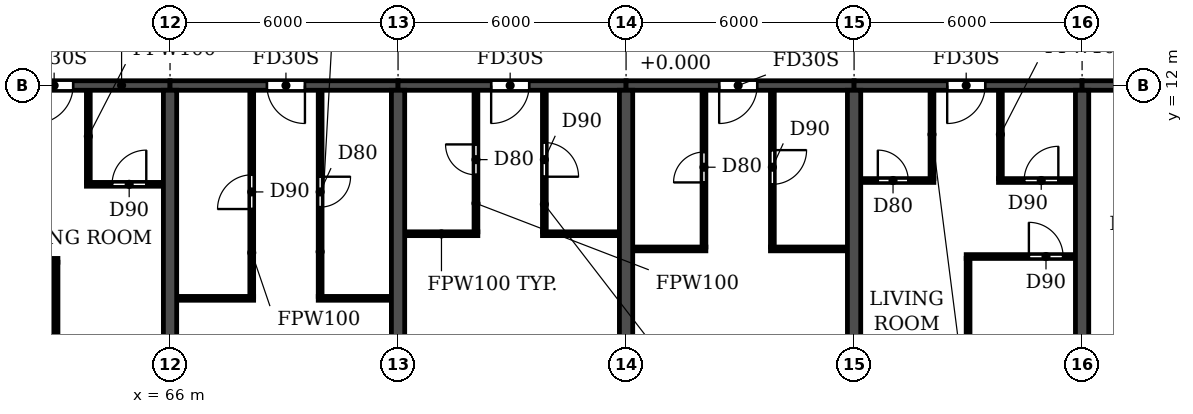
"""IFC4 building model, lengths in metres.
Left out: names, types, materials, properties, quantities, classifications, styles, units other than length and angle.
Written with IfcOpenShell. Run it as: python <this file> out.ifc"""

import sys

from ifc_helpers import new_model, si_unit, direction, frame, frame_2d, origin, place, context, subcontext, project, spatial, rectangle, extrude, element, fill, save


model = new_model("IFC4")
c1 = context("Model", 3, precision=1e-05, world=origin(), true_north=direction((0.0, 1.0)))
c2 = subcontext(c1, "Body", "Model", "MODEL_VIEW")
j1 = project(units=[si_unit("LENGTHUNIT", "METRE"), si_unit("PLANEANGLEUNIT", "RADIAN")], contexts=[c1])
p1 = place(None, origin())
s1 = spatial("IfcSite", under=j1, at=p1, CompositionType="ELEMENT")
p2 = place(p1, origin())
s2 = spatial("IfcBuilding", under=s1, at=p2, CompositionType="ELEMENT")
p3 = place(p2, frame((0.0, 0.0, 92.7)))
s3 = spatial("IfcBuildingStorey", under=s2, at=p3, CompositionType="ELEMENT", Elevation=92.7)
for number, where, z_axis, x_axis in (
    (1, (66.0, 0.2, 0.0), (0.0, 0.0, 1.0), (0.0, 1.0, 0.0)),
    (2, (72.0, 0.2, 0.0), (0.0, 0.0, 1.0), (0.0, 1.0, 0.0)),
    (3, (78.0, 0.2, 0.0), (0.0, 0.0, 1.0), (0.0, 1.0, 0.0)),
    (4, (84.0, 0.2, 0.0), (0.0, 0.0, 1.0), (0.0, 1.0, 0.0)),
    (5, (90.0, 0.2, 0.0), (0.0, 0.0, 1.0), (0.0, 1.0, 0.0)),
):
    element("IfcWall", number, at=place(p3, frame(where, z_axis=z_axis, x_axis=x_axis)), inside=s3, PredefinedType="SHEAR", context=c2, shape_type="SweptSolid", body=[
        extrude(rectangle(XDim=11.675, YDim=0.35, at=frame_2d((5.837, 0.0))), origin(), (0.0, 0.0, 1.0), 3.06),
    ])
p4 = place(p3, frame((60.0, 12.0, 0.0), z_axis=(0.0, 0.0, 1.0), x_axis=(1.0, 0.0, 0.0)))
e6 = element("IfcWall", 6, at=p4, inside=s3, PredefinedType="SHEAR", context=c2, shape_type="SweptSolid", body=[
    extrude(rectangle(XDim=6.0, YDim=0.25, at=frame_2d((3.0, 0.0))), origin(), (0.0, 0.0, 1.0), 2.46),
])
p5 = place(p4, frame((2.45, 0.0, 0.0)))
e7 = element("IfcOpeningElement", 7, at=p5, cuts=e6, PredefinedType="OPENING", context=c2, shape_type="SweptSolid", body=[
    extrude(rectangle(XDim=1.0, YDim=2.1, at=frame_2d((0.5, 1.05))), frame((0.0, 0.135, 0.0), z_axis=(0.0, -1.0, 0.0), x_axis=(1.0, 0.0, 0.0)), (0.0, 0.0, 1.0), 0.27),
])
p6 = place(p3, frame((66.0, 12.0, 0.0), z_axis=(0.0, 0.0, 1.0), x_axis=(1.0, 0.0, 0.0)))
e8 = element("IfcWall", 8, at=p6, inside=s3, PredefinedType="SHEAR", context=c2, shape_type="SweptSolid", body=[
    extrude(rectangle(XDim=6.0, YDim=0.25, at=frame_2d((3.0, 0.0))), origin(), (0.0, 0.0, 1.0), 2.46),
])
p7 = place(p6, frame((2.55, 0.0, 0.0)))
e9 = element("IfcOpeningElement", 9, at=p7, cuts=e8, PredefinedType="OPENING", context=c2, shape_type="SweptSolid", body=[
    extrude(rectangle(XDim=1.0, YDim=2.1, at=frame_2d((0.5, 1.05))), frame((0.0, 0.135, 0.0), z_axis=(0.0, -1.0, 0.0), x_axis=(1.0, 0.0, 0.0)), (0.0, 0.0, 1.0), 0.27),
])
p8 = place(p3, frame((72.0, 12.0, 0.0), z_axis=(0.0, 0.0, 1.0), x_axis=(1.0, 0.0, 0.0)))
e10 = element("IfcWall", 10, at=p8, inside=s3, PredefinedType="SHEAR", context=c2, shape_type="SweptSolid", body=[
    extrude(rectangle(XDim=6.0, YDim=0.25, at=frame_2d((3.0, 0.0))), origin(), (0.0, 0.0, 1.0), 2.46),
])
p9 = place(p8, frame((2.45, 0.0, 0.0)))
e11 = element("IfcOpeningElement", 11, at=p9, cuts=e10, PredefinedType="OPENING", context=c2, shape_type="SweptSolid", body=[
    extrude(rectangle(XDim=1.0, YDim=2.1, at=frame_2d((0.5, 1.05))), frame((0.0, 0.135, 0.0), z_axis=(0.0, -1.0, 0.0), x_axis=(1.0, 0.0, 0.0)), (0.0, 0.0, 1.0), 0.27),
])
p10 = place(p3, frame((78.0, 12.0, 0.0), z_axis=(0.0, 0.0, 1.0), x_axis=(1.0, 0.0, 0.0)))
e12 = element("IfcWall", 12, at=p10, inside=s3, PredefinedType="SHEAR", context=c2, shape_type="SweptSolid", body=[
    extrude(rectangle(XDim=6.0, YDim=0.25, at=frame_2d((3.0, 0.0))), origin(), (0.0, 0.0, 1.0), 2.46),
])
p11 = place(p10, frame((2.45, 0.0, 0.0)))
e13 = element("IfcOpeningElement", 13, at=p11, cuts=e12, PredefinedType="OPENING", context=c2, shape_type="SweptSolid", body=[
    extrude(rectangle(XDim=1.0, YDim=2.1, at=frame_2d((0.5, 1.05))), frame((0.0, 0.135, 0.0), z_axis=(0.0, -1.0, 0.0), x_axis=(1.0, 0.0, 0.0)), (0.0, 0.0, 1.0), 0.27),
])
p12 = place(p3, frame((84.0, 12.0, 0.0), z_axis=(0.0, 0.0, 1.0), x_axis=(1.0, 0.0, 0.0)))
e14 = element("IfcWall", 14, at=p12, inside=s3, PredefinedType="SHEAR", context=c2, shape_type="SweptSolid", body=[
    extrude(rectangle(XDim=6.0, YDim=0.25, at=frame_2d((3.0, 0.0))), origin(), (0.0, 0.0, 1.0), 2.46),
])
p13 = place(p12, frame((2.45, 0.0, 0.0)))
e15 = element("IfcOpeningElement", 15, at=p13, cuts=e14, PredefinedType="OPENING", context=c2, shape_type="SweptSolid", body=[
    extrude(rectangle(XDim=1.0, YDim=2.1, at=frame_2d((0.5, 1.05))), frame((0.0, 0.135, 0.0), z_axis=(0.0, -1.0, 0.0), x_axis=(1.0, 0.0, 0.0)), (0.0, 0.0, 1.0), 0.27),
])
p14 = place(p3, frame((90.0, 12.0, 0.0), z_axis=(0.0, 0.0, 1.0), x_axis=(1.0, 0.0, 0.0)))
e16 = element("IfcWall", 16, at=p14, inside=s3, PredefinedType="SHEAR", context=c2, shape_type="SweptSolid", body=[
    extrude(rectangle(XDim=5.8, YDim=0.25, at=frame_2d((2.9, 0.0))), origin(), (0.0, 0.0, 1.0), 2.46),
])
p15 = place(p14, frame((2.5, 0.0, 0.0)))
e17 = element("IfcOpeningElement", 17, at=p15, cuts=e16, PredefinedType="OPENING", context=c2, shape_type="SweptSolid", body=[
    extrude(rectangle(XDim=1.0, YDim=2.1, at=frame_2d((0.5, 1.05))), frame((0.0, 0.135, 0.0), z_axis=(0.0, -1.0, 0.0), x_axis=(1.0, 0.0, 0.0)), (0.0, 0.0, 1.0), 0.27),
])
p16 = place(p3, frame((66.185, 6.4, 0.0), z_axis=(0.0, 0.0, 1.0), x_axis=(1.0, 0.0, 0.0)))
e18 = element("IfcWall", 18, at=p16, inside=s3, PredefinedType="PARTITIONING", context=c2, shape_type="SweptSolid", body=[
    extrude(rectangle(XDim=2.015, YDim=0.1, at=frame_2d((1.007, 0.0))), origin(), (0.0, 0.0, 1.0), 3.06),
])
p17 = place(p3, frame((69.9, 6.4, 0.0), z_axis=(0.0, 0.0, 1.0), x_axis=(1.0, 0.0, 0.0)))
e19 = element("IfcWall", 19, at=p17, inside=s3, PredefinedType="PARTITIONING", context=c2, shape_type="SweptSolid", body=[
    extrude(rectangle(XDim=1.915, YDim=0.1, at=frame_2d((0.958, 0.0))), origin(), (0.0, 0.0, 1.0), 3.06),
])
p18 = place(p3, frame((60.185, 7.4, 0.0), z_axis=(0.0, 0.0, 1.0), x_axis=(1.0, 0.0, 0.0)))
e20 = element("IfcWall", 20, at=p18, inside=s3, PredefinedType="PARTITIONING", context=c2, shape_type="SweptSolid", body=[
    extrude(rectangle(XDim=2.865, YDim=0.1, at=frame_2d((1.433, 0.0))), origin(), (0.0, 0.0, 1.0), 3.06),
])
p19 = place(p18, frame((0.315, 0.0, 0.0)))
e21 = element("IfcOpeningElement", 21, at=p19, cuts=e20, PredefinedType="OPENING", context=c2, shape_type="SweptSolid", body=[
    extrude(rectangle(XDim=0.9, YDim=2.1, at=frame_2d((0.45, 1.05))), frame((0.0, 0.06, 0.0), z_axis=(0.0, -1.0, 0.0), x_axis=(1.0, 0.0, 0.0)), (0.0, 0.0, 1.0), 0.12),
])
p20 = place(p3, frame((86.95, 7.5, 0.0), z_axis=(0.0, 0.0, 1.0), x_axis=(1.0, 0.0, 0.0)))
e22 = element("IfcWall", 22, at=p20, inside=s3, PredefinedType="PARTITIONING", context=c2, shape_type="SweptSolid", body=[
    extrude(rectangle(XDim=2.865, YDim=0.1, at=frame_2d((1.433, 0.0))), origin(), (0.0, 0.0, 1.0), 3.06),
])
p21 = place(p20, frame((1.65, 0.0, 0.0)))
e23 = element("IfcOpeningElement", 23, at=p21, cuts=e22, PredefinedType="OPENING", context=c2, shape_type="SweptSolid", body=[
    extrude(rectangle(XDim=0.9, YDim=2.1, at=frame_2d((0.45, 1.05))), frame((0.0, 0.06, 0.0), z_axis=(0.0, -1.0, 0.0), x_axis=(1.0, 0.0, 0.0)), (0.0, 0.0, 1.0), 0.12),
])
p22 = place(p3, frame((78.185, 7.7, 0.0), z_axis=(0.0, 0.0, 1.0), x_axis=(1.0, 0.0, 0.0)))
e24 = element("IfcWall", 24, at=p22, inside=s3, PredefinedType="PARTITIONING", context=c2, shape_type="SweptSolid", body=[
    extrude(rectangle(XDim=1.915, YDim=0.1, at=frame_2d((0.958, 0.0))), origin(), (0.0, 0.0, 1.0), 3.06),
])
p23 = place(p3, frame((81.8, 7.7, 0.0), z_axis=(0.0, 0.0, 1.0), x_axis=(1.0, 0.0, 0.0)))
e25 = element("IfcWall", 25, at=p23, inside=s3, PredefinedType="PARTITIONING", context=c2, shape_type="SweptSolid", body=[
    extrude(rectangle(XDim=2.015, YDim=0.1, at=frame_2d((1.007, 0.0))), origin(), (0.0, 0.0, 1.0), 3.06),
])
p24 = place(p3, frame((72.185, 8.1, 0.0), z_axis=(0.0, 0.0, 1.0), x_axis=(1.0, 0.0, 0.0)))
e26 = element("IfcWall", 26, at=p24, inside=s3, PredefinedType="PARTITIONING", context=c2, shape_type="SweptSolid", body=[
    extrude(rectangle(XDim=1.915, YDim=0.1, at=frame_2d((0.958, 0.0))), origin(), (0.0, 0.0, 1.0), 3.06),
])
p25 = place(p3, frame((75.8, 8.1, 0.0), z_axis=(0.0, 0.0, 1.0), x_axis=(1.0, 0.0, 0.0)))
e27 = element("IfcWall", 27, at=p25, inside=s3, PredefinedType="PARTITIONING", context=c2, shape_type="SweptSolid", body=[
    extrude(rectangle(XDim=2.015, YDim=0.1, at=frame_2d((1.007, 0.0))), origin(), (0.0, 0.0, 1.0), 3.06),
])
p26 = place(p3, frame((63.8, 9.4, 0.0), z_axis=(0.0, 0.0, 1.0), x_axis=(1.0, 0.0, 0.0)))
e28 = element("IfcWall", 28, at=p26, inside=s3, PredefinedType="PARTITIONING", context=c2, shape_type="SweptSolid", body=[
    extrude(rectangle(XDim=2.015, YDim=0.1, at=frame_2d((1.007, 0.0))), origin(), (0.0, 0.0, 1.0), 3.06),
])
p27 = place(p26, frame((0.675, 0.0, 0.0)))
e29 = element("IfcOpeningElement", 29, at=p27, cuts=e28, PredefinedType="OPENING", context=c2, shape_type="SweptSolid", body=[
    extrude(rectangle(XDim=0.9, YDim=2.1, at=frame_2d((0.45, 1.05))), frame((0.0, 0.06, 0.0), z_axis=(0.0, -1.0, 0.0), x_axis=(1.0, 0.0, 0.0)), (0.0, 0.0, 1.0), 0.12),
])
p28 = place(p3, frame((84.185, 9.5, 0.0), z_axis=(0.0, 0.0, 1.0), x_axis=(1.0, 0.0, 0.0)))
e30 = element("IfcWall", 30, at=p28, inside=s3, PredefinedType="PARTITIONING", context=c2, shape_type="SweptSolid", body=[
    extrude(rectangle(XDim=1.915, YDim=0.1, at=frame_2d((0.958, 0.0))), origin(), (0.0, 0.0, 1.0), 3.06),
])
p29 = place(p28, frame((0.44, 0.0, 0.0)))
e31 = element("IfcOpeningElement", 31, at=p29, cuts=e30, PredefinedType="OPENING", context=c2, shape_type="SweptSolid", body=[
    extrude(rectangle(XDim=0.8, YDim=2.1, at=frame_2d((0.4, 1.05))), frame((0.0, 0.06, 0.0), z_axis=(0.0, -1.0, 0.0), x_axis=(1.0, 0.0, 0.0)), (0.0, 0.0, 1.0), 0.12),
])
p30 = place(p3, frame((87.8, 9.5, 0.0), z_axis=(0.0, 0.0, 1.0), x_axis=(1.0, 0.0, 0.0)))
e32 = element("IfcWall", 32, at=p30, inside=s3, PredefinedType="PARTITIONING", context=c2, shape_type="SweptSolid", body=[
    extrude(rectangle(XDim=2.015, YDim=0.1, at=frame_2d((1.007, 0.0))), origin(), (0.0, 0.0, 1.0), 3.06),
])
p31 = place(p30, frame((0.675, 0.0, 0.0)))
e33 = element("IfcOpeningElement", 33, at=p31, cuts=e32, PredefinedType="OPENING", context=c2, shape_type="SweptSolid", body=[
    extrude(rectangle(XDim=0.9, YDim=2.1, at=frame_2d((0.45, 1.05))), frame((0.0, 0.06, 0.0), z_axis=(0.0, -1.0, 0.0), x_axis=(1.0, 0.0, 0.0)), (0.0, 0.0, 1.0), 0.12),
])
p32 = place(p3, frame((63.0, 0.06, 0.0), z_axis=(0.0, 0.0, 1.0), x_axis=(0.0, 1.0, 0.0)))
e34 = element("IfcWall", 34, at=p32, inside=s3, PredefinedType="PARTITIONING", context=c2, shape_type="SweptSolid", body=[
    extrude(rectangle(XDim=7.29, YDim=0.1, at=frame_2d((3.645, 0.0))), origin(), (0.0, 0.0, 1.0), 3.06),
])
p33 = place(p3, frame((63.85, 9.45, 0.0), z_axis=(0.0, 0.0, 1.0), x_axis=(0.0, 1.0, 0.0)))
e35 = element("IfcWall", 35, at=p33, inside=s3, PredefinedType="PARTITIONING", context=c2, shape_type="SweptSolid", body=[
    extrude(rectangle(XDim=2.415, YDim=0.1, at=frame_2d((1.208, 0.0))), origin(), (0.0, 0.0, 1.0), 3.06),
])
p34 = place(p3, frame((68.15, 6.45, 0.0), z_axis=(0.0, 0.0, 1.0), x_axis=(0.0, 1.0, 0.0)))
e36 = element("IfcWall", 36, at=p34, inside=s3, PredefinedType="PARTITIONING", context=c2, shape_type="SweptSolid", body=[
    extrude(rectangle(XDim=5.415, YDim=0.1, at=frame_2d((2.708, 0.0))), origin(), (0.0, 0.0, 1.0), 3.06),
])
p35 = place(p34, frame((2.3, 0.0, 0.0)))
e37 = element("IfcOpeningElement", 37, at=p35, cuts=e36, PredefinedType="OPENING", context=c2, shape_type="SweptSolid", body=[
    extrude(rectangle(XDim=0.9, YDim=2.1, at=frame_2d((0.45, 1.05))), frame((0.0, 0.06, 0.0), z_axis=(0.0, -1.0, 0.0), x_axis=(1.0, 0.0, 0.0)), (0.0, 0.0, 1.0), 0.12),
])
p36 = place(p3, frame((69.95, 6.45, 0.0), z_axis=(0.0, 0.0, 1.0), x_axis=(0.0, 1.0, 0.0)))
e38 = element("IfcWall", 38, at=p36, inside=s3, PredefinedType="PARTITIONING", context=c2, shape_type="SweptSolid", body=[
    extrude(rectangle(XDim=5.415, YDim=0.1, at=frame_2d((2.708, 0.0))), origin(), (0.0, 0.0, 1.0), 3.06),
])
p37 = place(p36, frame((2.35, 0.0, 0.0)))
e39 = element("IfcOpeningElement", 39, at=p37, cuts=e38, PredefinedType="OPENING", context=c2, shape_type="SweptSolid", body=[
    extrude(rectangle(XDim=0.8, YDim=2.1, at=frame_2d((0.4, 1.05))), frame((0.0, 0.06, 0.0), z_axis=(0.0, -1.0, 0.0), x_axis=(1.0, 0.0, 0.0)), (0.0, 0.0, 1.0), 0.12),
])
p38 = place(p3, frame((74.05, 8.15, 0.0), z_axis=(0.0, 0.0, 1.0), x_axis=(0.0, 1.0, 0.0)))
e40 = element("IfcWall", 40, at=p38, inside=s3, PredefinedType="PARTITIONING", context=c2, shape_type="SweptSolid", body=[
    extrude(rectangle(XDim=3.715, YDim=0.1, at=frame_2d((1.857, 0.0))), origin(), (0.0, 0.0, 1.0), 3.06),
])
p39 = place(p38, frame((1.5, 0.0, 0.0)))
e41 = element("IfcOpeningElement", 41, at=p39, cuts=e40, PredefinedType="OPENING", context=c2, shape_type="SweptSolid", body=[
    extrude(rectangle(XDim=0.8, YDim=2.1, at=frame_2d((0.4, 1.05))), frame((0.0, 0.06, 0.0), z_axis=(0.0, -1.0, 0.0), x_axis=(1.0, 0.0, 0.0)), (0.0, 0.0, 1.0), 0.12),
])
p40 = place(p3, frame((75.85, 8.15, 0.0), z_axis=(0.0, 0.0, 1.0), x_axis=(0.0, 1.0, 0.0)))
e42 = element("IfcWall", 42, at=p40, inside=s3, PredefinedType="PARTITIONING", context=c2, shape_type="SweptSolid", body=[
    extrude(rectangle(XDim=3.715, YDim=0.1, at=frame_2d((1.857, 0.0))), origin(), (0.0, 0.0, 1.0), 3.06),
])
p41 = place(p40, frame((1.45, 0.0, 0.0)))
e43 = element("IfcOpeningElement", 43, at=p41, cuts=e42, PredefinedType="OPENING", context=c2, shape_type="SweptSolid", body=[
    extrude(rectangle(XDim=0.9, YDim=2.1, at=frame_2d((0.45, 1.05))), frame((0.0, 0.06, 0.0), z_axis=(0.0, -1.0, 0.0), x_axis=(1.0, 0.0, 0.0)), (0.0, 0.0, 1.0), 0.12),
])
p42 = place(p3, frame((80.05, 7.75, 0.0), z_axis=(0.0, 0.0, 1.0), x_axis=(0.0, 1.0, 0.0)))
e44 = element("IfcWall", 44, at=p42, inside=s3, PredefinedType="PARTITIONING", context=c2, shape_type="SweptSolid", body=[
    extrude(rectangle(XDim=4.115, YDim=0.1, at=frame_2d((2.058, 0.0))), origin(), (0.0, 0.0, 1.0), 3.06),
])
p43 = place(p42, frame((1.7, 0.0, 0.0)))
e45 = element("IfcOpeningElement", 45, at=p43, cuts=e44, PredefinedType="OPENING", context=c2, shape_type="SweptSolid", body=[
    extrude(rectangle(XDim=0.8, YDim=2.1, at=frame_2d((0.4, 1.05))), frame((0.0, 0.06, 0.0), z_axis=(0.0, -1.0, 0.0), x_axis=(1.0, 0.0, 0.0)), (0.0, 0.0, 1.0), 0.12),
])
p44 = place(p3, frame((81.85, 7.75, 0.0), z_axis=(0.0, 0.0, 1.0), x_axis=(0.0, 1.0, 0.0)))
e46 = element("IfcWall", 46, at=p44, inside=s3, PredefinedType="PARTITIONING", context=c2, shape_type="SweptSolid", body=[
    extrude(rectangle(XDim=4.115, YDim=0.1, at=frame_2d((2.058, 0.0))), origin(), (0.0, 0.0, 1.0), 3.06),
])
p45 = place(p44, frame((1.65, 0.0, 0.0)))
e47 = element("IfcOpeningElement", 47, at=p45, cuts=e46, PredefinedType="OPENING", context=c2, shape_type="SweptSolid", body=[
    extrude(rectangle(XDim=0.9, YDim=2.1, at=frame_2d((0.45, 1.05))), frame((0.0, 0.06, 0.0), z_axis=(0.0, -1.0, 0.0), x_axis=(1.0, 0.0, 0.0)), (0.0, 0.0, 1.0), 0.12),
])
p46 = place(p3, frame((86.05, 9.55, 0.0), z_axis=(0.0, 0.0, 1.0), x_axis=(0.0, 1.0, 0.0)))
e48 = element("IfcWall", 48, at=p46, inside=s3, PredefinedType="PARTITIONING", context=c2, shape_type="SweptSolid", body=[
    extrude(rectangle(XDim=2.315, YDim=0.1, at=frame_2d((1.157, 0.0))), origin(), (0.0, 0.0, 1.0), 3.06),
])
p47 = place(p3, frame((87.0, 0.06, 0.0), z_axis=(0.0, 0.0, 1.0), x_axis=(0.0, 1.0, 0.0)))
e49 = element("IfcWall", 49, at=p47, inside=s3, PredefinedType="PARTITIONING", context=c2, shape_type="SweptSolid", body=[
    extrude(rectangle(XDim=7.39, YDim=0.1, at=frame_2d((3.695, 0.0))), origin(), (0.0, 0.0, 1.0), 3.06),
])
p48 = place(p3, frame((87.85, 9.55, 0.0), z_axis=(0.0, 0.0, 1.0), x_axis=(0.0, 1.0, 0.0)))
e50 = element("IfcWall", 50, at=p48, inside=s3, PredefinedType="PARTITIONING", context=c2, shape_type="SweptSolid", body=[
    extrude(rectangle(XDim=2.315, YDim=0.1, at=frame_2d((1.157, 0.0))), origin(), (0.0, 0.0, 1.0), 3.06),
])
p49 = place(p5, frame((1.0, 0.0, 0.0), z_axis=(0.0, 0.0, 1.0), x_axis=(-1.0, 0.0, 0.0)))
e51 = element("IfcDoor", 51, at=p49, inside=s3, OperationType="SINGLE_SWING_RIGHT", PredefinedType="DOOR", context=c2, shape_type="SweptSolid", body=[
    extrude(rectangle(XDim=1.0, YDim=2.1, at=frame_2d((0.5, 1.05))), frame((0.0, 0.025, 0.0), z_axis=(0.0, -1.0, 0.0), x_axis=(1.0, 0.0, 0.0)), (0.0, 0.0, 1.0), 0.05),
])
fill(e7, e51)
p50 = place(p27, origin())
e52 = element("IfcDoor", 52, at=p50, inside=s3, OperationType="SINGLE_SWING_RIGHT", PredefinedType="DOOR", context=c2, shape_type="SweptSolid", body=[
    extrude(rectangle(XDim=0.9, YDim=2.1, at=frame_2d((0.45, 1.05))), frame((0.0, 0.025, 0.0), z_axis=(0.0, -1.0, 0.0), x_axis=(1.0, 0.0, 0.0)), (0.0, 0.0, 1.0), 0.05),
])
fill(e29, e52)
p51 = place(p35, origin())
e53 = element("IfcDoor", 53, at=p51, inside=s3, OperationType="SINGLE_SWING_LEFT", PredefinedType="DOOR", context=c2, shape_type="SweptSolid", body=[
    extrude(rectangle(XDim=0.9, YDim=2.1, at=frame_2d((0.45, 1.05))), frame((0.0, 0.025, 0.0), z_axis=(0.0, -1.0, 0.0), x_axis=(1.0, 0.0, 0.0)), (0.0, 0.0, 1.0), 0.05),
])
fill(e37, e53)
p52 = place(p7, frame((1.0, 0.0, 0.0), z_axis=(0.0, 0.0, 1.0), x_axis=(-1.0, 0.0, 0.0)))
e54 = element("IfcDoor", 54, at=p52, inside=s3, OperationType="SINGLE_SWING_LEFT", PredefinedType="DOOR", context=c2, shape_type="SweptSolid", body=[
    extrude(rectangle(XDim=1.0, YDim=2.1, at=frame_2d((0.5, 1.05))), frame((0.0, 0.025, 0.0), z_axis=(0.0, -1.0, 0.0), x_axis=(1.0, 0.0, 0.0)), (0.0, 0.0, 1.0), 0.05),
])
fill(e9, e54)
p53 = place(p37, frame((0.8, 0.0, 0.0), z_axis=(0.0, 0.0, 1.0), x_axis=(-1.0, 0.0, 0.0)))
e55 = element("IfcDoor", 55, at=p53, inside=s3, OperationType="SINGLE_SWING_LEFT", PredefinedType="DOOR", context=c2, shape_type="SweptSolid", body=[
    extrude(rectangle(XDim=0.8, YDim=2.1, at=frame_2d((0.4, 1.05))), frame((0.0, 0.025, 0.0), z_axis=(0.0, -1.0, 0.0), x_axis=(1.0, 0.0, 0.0)), (0.0, 0.0, 1.0), 0.05),
])
fill(e39, e55)
p54 = place(p39, origin())
e56 = element("IfcDoor", 56, at=p54, inside=s3, OperationType="SINGLE_SWING_RIGHT", PredefinedType="DOOR", context=c2, shape_type="SweptSolid", body=[
    extrude(rectangle(XDim=0.8, YDim=2.1, at=frame_2d((0.4, 1.05))), frame((0.0, 0.025, 0.0), z_axis=(0.0, -1.0, 0.0), x_axis=(1.0, 0.0, 0.0)), (0.0, 0.0, 1.0), 0.05),
])
fill(e41, e56)
p55 = place(p9, frame((1.0, 0.0, 0.0), z_axis=(0.0, 0.0, 1.0), x_axis=(-1.0, 0.0, 0.0)))
e57 = element("IfcDoor", 57, at=p55, inside=s3, OperationType="SINGLE_SWING_RIGHT", PredefinedType="DOOR", context=c2, shape_type="SweptSolid", body=[
    extrude(rectangle(XDim=1.0, YDim=2.1, at=frame_2d((0.5, 1.05))), frame((0.0, 0.025, 0.0), z_axis=(0.0, -1.0, 0.0), x_axis=(1.0, 0.0, 0.0)), (0.0, 0.0, 1.0), 0.05),
])
fill(e11, e57)
p56 = place(p41, frame((0.9, 0.0, 0.0), z_axis=(0.0, 0.0, 1.0), x_axis=(-1.0, 0.0, 0.0)))
e58 = element("IfcDoor", 58, at=p56, inside=s3, OperationType="SINGLE_SWING_RIGHT", PredefinedType="DOOR", context=c2, shape_type="SweptSolid", body=[
    extrude(rectangle(XDim=0.9, YDim=2.1, at=frame_2d((0.45, 1.05))), frame((0.0, 0.025, 0.0), z_axis=(0.0, -1.0, 0.0), x_axis=(1.0, 0.0, 0.0)), (0.0, 0.0, 1.0), 0.05),
])
fill(e43, e58)
p57 = place(p43, origin())
e59 = element("IfcDoor", 59, at=p57, inside=s3, OperationType="SINGLE_SWING_LEFT", PredefinedType="DOOR", context=c2, shape_type="SweptSolid", body=[
    extrude(rectangle(XDim=0.8, YDim=2.1, at=frame_2d((0.4, 1.05))), frame((0.0, 0.025, 0.0), z_axis=(0.0, -1.0, 0.0), x_axis=(1.0, 0.0, 0.0)), (0.0, 0.0, 1.0), 0.05),
])
fill(e45, e59)
p58 = place(p11, frame((1.0, 0.0, 0.0), z_axis=(0.0, 0.0, 1.0), x_axis=(-1.0, 0.0, 0.0)))
e60 = element("IfcDoor", 60, at=p58, inside=s3, OperationType="SINGLE_SWING_RIGHT", PredefinedType="DOOR", context=c2, shape_type="SweptSolid", body=[
    extrude(rectangle(XDim=1.0, YDim=2.1, at=frame_2d((0.5, 1.05))), frame((0.0, 0.025, 0.0), z_axis=(0.0, -1.0, 0.0), x_axis=(1.0, 0.0, 0.0)), (0.0, 0.0, 1.0), 0.05),
])
fill(e13, e60)
p59 = place(p45, frame((0.9, 0.0, 0.0), z_axis=(0.0, 0.0, 1.0), x_axis=(-1.0, 0.0, 0.0)))
e61 = element("IfcDoor", 61, at=p59, inside=s3, OperationType="SINGLE_SWING_LEFT", PredefinedType="DOOR", context=c2, shape_type="SweptSolid", body=[
    extrude(rectangle(XDim=0.9, YDim=2.1, at=frame_2d((0.45, 1.05))), frame((0.0, 0.025, 0.0), z_axis=(0.0, -1.0, 0.0), x_axis=(1.0, 0.0, 0.0)), (0.0, 0.0, 1.0), 0.05),
])
fill(e47, e61)
p60 = place(p29, origin())
e62 = element("IfcDoor", 62, at=p60, inside=s3, OperationType="SINGLE_SWING_LEFT", PredefinedType="DOOR", context=c2, shape_type="SweptSolid", body=[
    extrude(rectangle(XDim=0.8, YDim=2.1, at=frame_2d((0.4, 1.05))), frame((0.0, 0.025, 0.0), z_axis=(0.0, -1.0, 0.0), x_axis=(1.0, 0.0, 0.0)), (0.0, 0.0, 1.0), 0.05),
])
fill(e31, e62)
p61 = place(p13, frame((1.0, 0.0, 0.0), z_axis=(0.0, 0.0, 1.0), x_axis=(-1.0, 0.0, 0.0)))
e63 = element("IfcDoor", 63, at=p61, inside=s3, OperationType="SINGLE_SWING_RIGHT", PredefinedType="DOOR", context=c2, shape_type="SweptSolid", body=[
    extrude(rectangle(XDim=1.0, YDim=2.1, at=frame_2d((0.5, 1.05))), frame((0.0, 0.025, 0.0), z_axis=(0.0, -1.0, 0.0), x_axis=(1.0, 0.0, 0.0)), (0.0, 0.0, 1.0), 0.05),
])
fill(e15, e63)
p62 = place(p31, origin())
e64 = element("IfcDoor", 64, at=p62, inside=s3, OperationType="SINGLE_SWING_RIGHT", PredefinedType="DOOR", context=c2, shape_type="SweptSolid", body=[
    extrude(rectangle(XDim=0.9, YDim=2.1, at=frame_2d((0.45, 1.05))), frame((0.0, 0.025, 0.0), z_axis=(0.0, -1.0, 0.0), x_axis=(1.0, 0.0, 0.0)), (0.0, 0.0, 1.0), 0.05),
])
fill(e33, e64)
p63 = place(p21, origin())
e65 = element("IfcDoor", 65, at=p63, inside=s3, OperationType="SINGLE_SWING_LEFT", PredefinedType="DOOR", context=c2, shape_type="SweptSolid", body=[
    extrude(rectangle(XDim=0.9, YDim=2.1, at=frame_2d((0.45, 1.05))), frame((0.0, 0.025, 0.0), z_axis=(0.0, -1.0, 0.0), x_axis=(1.0, 0.0, 0.0)), (0.0, 0.0, 1.0), 0.05),
])
fill(e23, e65)
save(model, sys.argv[1])
